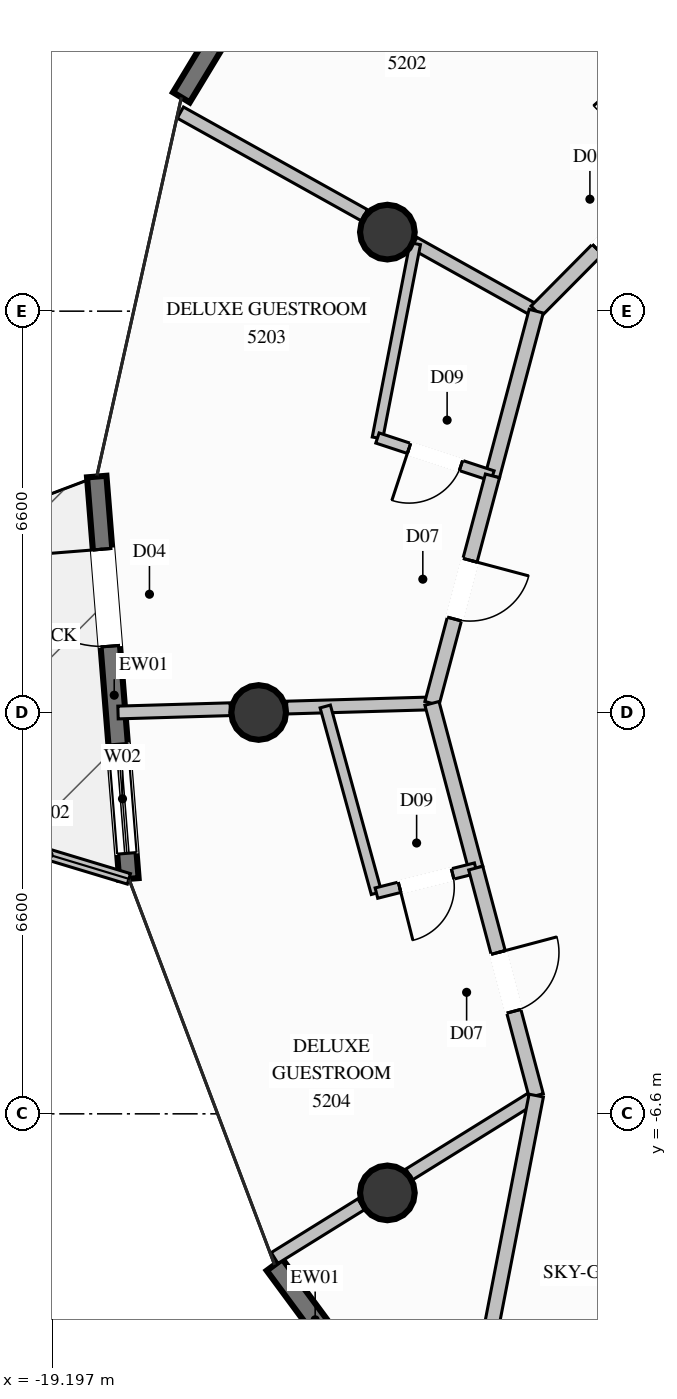
"""IFC4 building model, lengths in metres.
Left out: names, types, materials, properties, quantities, classifications, styles, units other than length and angle.
Written with IfcOpenShell. Run it as: python <this file> out.ifc"""

import sys

from ifc_helpers import new_model, si_unit, direction, frame, frame_2d, origin, origin_2d, place, context, subcontext, project, spatial, rectangle, circle, extrude, element, fill, save


model = new_model("IFC4")
c1 = context("Model", 3, precision=1e-05, world=origin(), true_north=direction((0.0, 1.0)))
c2 = subcontext(c1, "Body", "Model", "MODEL_VIEW")
j1 = project(units=[si_unit("LENGTHUNIT", "METRE"), si_unit("PLANEANGLEUNIT", "RADIAN")], contexts=[c1])
p1 = place(None, origin())
s1 = spatial("IfcSite", under=j1, at=p1, CompositionType="ELEMENT")
p2 = place(p1, origin())
s2 = spatial("IfcBuilding", under=s1, at=p2, CompositionType="ELEMENT")
p3 = place(p2, frame((0.0, 0.0, 194.8)))
s3 = spatial("IfcBuildingStorey", under=s2, at=p3, CompositionType="ELEMENT", Elevation=194.8)
for number, where, z_axis, x_axis in (
    (1, (-13.683, 7.9, 0.0), (0.0, 0.0, 1.0), (1.0, 0.0, 0.0)),
    (2, (-15.8, 0.0, 0.0), (0.0, 0.0, 1.0), (1.0, 0.0, 0.0)),
    (3, (-13.683, -7.9, 0.0), (0.0, 0.0, 1.0), (1.0, 0.0, 0.0)),
):
    element("IfcColumn", number, at=place(p3, frame(where, z_axis=z_axis, x_axis=x_axis)), inside=s3, PredefinedType="COLUMN", context=c2, shape_type="SweptSolid", body=[
        extrude(circle(Radius=0.45, at=origin_2d()), origin(), (0.0, 0.0, 1.0), 3.6),
    ])
p4 = place(p3, frame((-17.071, 10.116, 0.0), z_axis=(0.0, 0.0, 1.0), x_axis=(0.517847159829, 0.855473155077, 0.0)))
e4 = element("IfcWall", 4, at=p4, inside=s3, PredefinedType="SOLIDWALL", context=c2, shape_type="SweptSolid", body=[
    extrude(rectangle(XDim=6.131, YDim=0.32, at=frame_2d((3.066, 0.0))), origin(), (0.0, 0.0, 1.0), 3.36),
])
p5 = place(p4, frame((2.166, 0.0, 0.35)))
e5 = element("IfcOpeningElement", 5, at=p5, cuts=e4, PredefinedType="OPENING", context=c2, shape_type="SweptSolid", body=[
    extrude(rectangle(XDim=1.8, YDim=2.6, at=frame_2d((0.9, 1.3))), frame((0.0, 0.17, 0.0), z_axis=(0.0, -1.0, 0.0), x_axis=(1.0, 0.0, 0.0)), (0.0, 0.0, 1.0), 0.34),
])
p6 = place(p3, frame((-17.934, -2.736, 0.0), z_axis=(0.0, 0.0, 1.0), x_axis=(-0.079675045139, 0.996820890222, 0.0)))
e6 = element("IfcWall", 6, at=p6, inside=s3, PredefinedType="SOLIDWALL", context=c2, shape_type="SweptSolid", body=[
    extrude(rectangle(XDim=6.637, YDim=0.32, at=frame_2d((3.318, 0.0))), origin(), (0.0, 0.0, 1.0), 3.36),
])
p7 = place(p6, frame((0.421, 0.0, 0.35)))
e7 = element("IfcOpeningElement", 7, at=p7, cuts=e6, PredefinedType="OPENING", context=c2, shape_type="SweptSolid", body=[
    extrude(rectangle(XDim=1.8, YDim=2.6, at=frame_2d((0.9, 1.3))), frame((0.0, 0.17, 0.0), z_axis=(0.0, -1.0, 0.0), x_axis=(1.0, 0.0, 0.0)), (0.0, 0.0, 1.0), 0.34),
])
p8 = place(p6, frame((3.839, 0.0, 0.0)))
e8 = element("IfcOpeningElement", 8, at=p8, cuts=e6, PredefinedType="OPENING", context=c2, shape_type="SweptSolid", body=[
    extrude(rectangle(XDim=1.6, YDim=2.3, at=frame_2d((0.8, 1.15))), frame((0.0, 0.17, 0.0), z_axis=(0.0, -1.0, 0.0), x_axis=(1.0, 0.0, 0.0)), (0.0, 0.0, 1.0), 0.34),
])
p9 = place(p3, frame((-11.508, -14.542, 0.0), z_axis=(0.0, 0.0, 1.0), x_axis=(-0.593926605151, 0.804519227672, 0.0)))
e9 = element("IfcWall", 9, at=p9, inside=s3, PredefinedType="SOLIDWALL", context=c2, shape_type="SweptSolid", body=[
    extrude(rectangle(XDim=6.785, YDim=0.32, at=frame_2d((3.393, 0.0))), origin(), (0.0, 0.0, 1.0), 3.36),
])
p10 = place(p9, frame((2.488, 0.0, 0.35)))
e10 = element("IfcOpeningElement", 10, at=p10, cuts=e9, PredefinedType="OPENING", context=c2, shape_type="SweptSolid", body=[
    extrude(rectangle(XDim=1.8, YDim=2.6, at=frame_2d((0.9, 1.3))), frame((0.0, 0.17, 0.0), z_axis=(0.0, -1.0, 0.0), x_axis=(1.0, 0.0, 0.0)), (0.0, 0.0, 1.0), 0.34),
])
p11 = place(p3, frame((-20.563, -1.942, 0.0), z_axis=(0.0, 0.0, 1.0), x_axis=(0.957271539456, -0.289190594154, 0.0)))
e11 = element("IfcWall", 11, at=p11, inside=s3, PredefinedType="PARAPET", context=c2, shape_type="SweptSolid", body=[
    extrude(rectangle(XDim=2.746, YDim=0.18, at=frame_2d((1.373, 0.0))), origin(), (0.0, 0.0, 1.0), 1.12),
])
p12 = place(p3, frame((-11.235, 6.6, 0.0), z_axis=(0.0, 0.0, 1.0), x_axis=(-0.873326612339, 0.487135123123, 0.0)))
e12 = element("IfcWall", 12, at=p12, inside=s3, PredefinedType="PARTITIONING", context=c2, shape_type="SweptSolid", body=[
    extrude(rectangle(XDim=2.305, YDim=0.21, at=frame_2d((1.152, 0.0))), origin(), (0.0, 0.0, 1.0), 2.801),
])
p13 = place(p3, frame((-14.062, 8.178, 0.0), z_axis=(0.0, 0.0, 1.0), x_axis=(-0.873305073503, 0.487173735533, 0.0)))
e13 = element("IfcWall", 13, at=p13, inside=s3, PredefinedType="PARTITIONING", context=c2, shape_type="SweptSolid", body=[
    extrude(rectangle(XDim=3.465, YDim=0.21, at=frame_2d((1.732, 0.0))), origin(), (0.0, 0.0, 1.0), 3.36),
])
p14 = place(p3, frame((-12.95, 0.15, 0.0), z_axis=(0.0, 0.0, 1.0), x_axis=(-0.999584294169, -0.028831213149, 0.0)))
e14 = element("IfcWall", 14, at=p14, inside=s3, PredefinedType="PARTITIONING", context=c2, shape_type="SweptSolid", body=[
    extrude(rectangle(XDim=2.388, YDim=0.21, at=frame_2d((1.194, 0.0))), origin(), (0.0, 0.0, 1.0), 3.36),
])
p15 = place(p3, frame((-16.267, 0.054, 0.0), z_axis=(0.0, 0.0, 1.0), x_axis=(-0.999573108103, -0.029216460374, 0.0)))
e15 = element("IfcWall", 15, at=p15, inside=s3, PredefinedType="PARTITIONING", context=c2, shape_type="SweptSolid", body=[
    extrude(rectangle(XDim=1.847, YDim=0.21, at=frame_2d((0.923, 0.0))), origin(), (0.0, 0.0, 1.0), 3.36),
])
p16 = place(p3, frame((-11.235, -6.3, 0.0), z_axis=(0.0, 0.0, 1.0), x_axis=(-0.8495787928, -0.527461728302, 0.0)))
e16 = element("IfcWall", 16, at=p16, inside=s3, PredefinedType="PARTITIONING", context=c2, shape_type="SweptSolid", body=[
    extrude(rectangle(XDim=2.459, YDim=0.21, at=frame_2d((1.229, 0.0))), origin(), (0.0, 0.0, 1.0), 2.801),
])
p17 = place(p3, frame((-14.114, -8.087, 0.0), z_axis=(0.0, 0.0, 1.0), x_axis=(-0.849606407473, -0.52741724695, 0.0)))
e17 = element("IfcWall", 17, at=p17, inside=s3, PredefinedType="PARTITIONING", context=c2, shape_type="SweptSolid", body=[
    extrude(rectangle(XDim=1.676, YDim=0.21, at=frame_2d((0.838, 0.0))), origin(), (0.0, 0.0, 1.0), 3.36),
])
p18 = place(p3, frame((-8.518, 9.339, 0.0), z_axis=(0.0, 0.0, 1.0), x_axis=(-0.7042534056, -0.70994868878, 0.0)))
e18 = element("IfcWall", 18, at=p18, inside=s3, PredefinedType="PARTITIONING", context=c2, shape_type="SweptSolid", body=[
    extrude(rectangle(XDim=3.858, YDim=0.24, at=frame_2d((1.929, 0.0))), origin(), (0.0, 0.0, 1.0), 3.36),
])
p19 = place(p18, frame((1.429, 0.0, 0.0)))
e19 = element("IfcOpeningElement", 19, at=p19, cuts=e18, PredefinedType="OPENING", context=c2, shape_type="SweptSolid", body=[
    extrude(rectangle(XDim=1.0, YDim=2.2, at=frame_2d((0.5, 1.1))), frame((0.0, 0.13, 0.0), z_axis=(0.0, -1.0, 0.0), x_axis=(1.0, 0.0, 0.0)), (0.0, 0.0, 1.0), 0.26),
])
p20 = place(p3, frame((-11.235, 6.6, 0.0), z_axis=(0.0, 0.0, 1.0), x_axis=(-0.25685481711, -0.966450000221, 0.0)))
e20 = element("IfcWall", 20, at=p20, inside=s3, PredefinedType="PARTITIONING", context=c2, shape_type="SweptSolid", body=[
    extrude(rectangle(XDim=2.803, YDim=0.24, at=frame_2d((1.401, 0.0))), origin(), (0.0, 0.0, 1.0), 3.36),
])
p21 = place(p3, frame((-13.225, 7.71, 0.0), z_axis=(0.0, 0.0, 1.0), x_axis=(-0.190691026057, -0.981650107004, 0.0)))
e21 = element("IfcWall", 21, at=p21, inside=s3, PredefinedType="PLUMBINGWALL", context=c2, shape_type="SweptSolid", body=[
    extrude(rectangle(XDim=3.256, YDim=0.175, at=frame_2d((1.628, 0.0))), origin(), (0.0, 0.0, 1.0), 2.929),
])
p22 = place(p3, frame((-11.955, 3.891, 0.0), z_axis=(0.0, 0.0, 1.0), x_axis=(-0.949805498967, 0.312841036522, 0.0)))
e22 = element("IfcWall", 22, at=p22, inside=s3, PredefinedType="PLUMBINGWALL", context=c2, shape_type="SweptSolid", body=[
    extrude(rectangle(XDim=1.991, YDim=0.175, at=frame_2d((0.995, 0.0))), origin(), (0.0, 0.0, 1.0), 3.36),
])
p23 = place(p22, frame((0.545, 0.0, 0.0)))
e23 = element("IfcOpeningElement", 23, at=p23, cuts=e22, PredefinedType="OPENING", context=c2, shape_type="SweptSolid", body=[
    extrude(rectangle(XDim=0.9, YDim=2.1, at=frame_2d((0.45, 1.05))), frame((0.0, 0.098, 0.0), z_axis=(0.0, -1.0, 0.0), x_axis=(1.0, 0.0, 0.0)), (0.0, 0.0, 1.0), 0.195),
])
p24 = place(p3, frame((-11.955, 3.891, 0.0), z_axis=(0.0, 0.0, 1.0), x_axis=(-0.256991373998, -0.96641369697, 0.0)))
e24 = element("IfcWall", 24, at=p24, inside=s3, PredefinedType="PARTITIONING", context=c2, shape_type="SweptSolid", body=[
    extrude(rectangle(XDim=3.871, YDim=0.24, at=frame_2d((1.936, 0.0))), origin(), (0.0, 0.0, 1.0), 3.36),
])
p25 = place(p24, frame((1.436, 0.0, 0.0)))
e25 = element("IfcOpeningElement", 25, at=p25, cuts=e24, PredefinedType="OPENING", context=c2, shape_type="SweptSolid", body=[
    extrude(rectangle(XDim=1.0, YDim=2.2, at=frame_2d((0.5, 1.1))), frame((0.0, 0.13, 0.0), z_axis=(0.0, -1.0, 0.0), x_axis=(1.0, 0.0, 0.0)), (0.0, 0.0, 1.0), 0.26),
])
p26 = place(p3, frame((-12.95, 0.15, 0.0), z_axis=(0.0, 0.0, 1.0), x_axis=(0.25685481711, -0.966450000221, 0.0)))
e26 = element("IfcWall", 26, at=p26, inside=s3, PredefinedType="PARTITIONING", context=c2, shape_type="SweptSolid", body=[
    extrude(rectangle(XDim=2.803, YDim=0.24, at=frame_2d((1.401, 0.0))), origin(), (0.0, 0.0, 1.0), 3.36),
])
p27 = place(p3, frame((-14.705, 0.099, 0.0), z_axis=(0.0, 0.0, 1.0), x_axis=(0.264584095524, -0.964362616652, 0.0)))
e27 = element("IfcWall", 27, at=p27, inside=s3, PredefinedType="PLUMBINGWALL", context=c2, shape_type="SweptSolid", body=[
    extrude(rectangle(XDim=3.183, YDim=0.175, at=frame_2d((1.591, 0.0))), origin(), (0.0, 0.0, 1.0), 3.36),
])
p28 = place(p3, frame((-12.23, -2.559, 0.0), z_axis=(0.0, 0.0, 1.0), x_axis=(-0.969774675768, -0.244002209496, 0.0)))
e28 = element("IfcWall", 28, at=p28, inside=s3, PredefinedType="PLUMBINGWALL", context=c2, shape_type="SweptSolid", body=[
    extrude(rectangle(XDim=1.684, YDim=0.175, at=frame_2d((0.842, 0.0))), origin(), (0.0, 0.0, 1.0), 3.36),
])
p29 = place(p28, frame((0.392, 0.0, 0.0)))
e29 = element("IfcOpeningElement", 29, at=p29, cuts=e28, PredefinedType="OPENING", context=c2, shape_type="SweptSolid", body=[
    extrude(rectangle(XDim=0.9, YDim=2.1, at=frame_2d((0.45, 1.05))), frame((0.0, 0.098, 0.0), z_axis=(0.0, -1.0, 0.0), x_axis=(1.0, 0.0, 0.0)), (0.0, 0.0, 1.0), 0.195),
])
p30 = place(p3, frame((-12.23, -2.559, 0.0), z_axis=(0.0, 0.0, 1.0), x_axis=(0.257007037833, -0.966409531464, 0.0)))
e30 = element("IfcWall", 30, at=p30, inside=s3, PredefinedType="PARTITIONING", context=c2, shape_type="SweptSolid", body=[
    extrude(rectangle(XDim=3.871, YDim=0.24, at=frame_2d((1.936, 0.0))), origin(), (0.0, 0.0, 1.0), 3.36),
])
p31 = place(p30, frame((1.436, 0.0, 0.0)))
e31 = element("IfcOpeningElement", 31, at=p31, cuts=e30, PredefinedType="OPENING", context=c2, shape_type="SweptSolid", body=[
    extrude(rectangle(XDim=1.0, YDim=2.2, at=frame_2d((0.5, 1.1))), frame((0.0, 0.13, 0.0), z_axis=(0.0, -1.0, 0.0), x_axis=(1.0, 0.0, 0.0)), (0.0, 0.0, 1.0), 0.26),
])
p32 = place(p3, frame((-11.235, -6.3, 0.0), z_axis=(0.0, 0.0, 1.0), x_axis=(-0.190095078136, -0.981765685522, 0.0)))
e32 = element("IfcWall", 32, at=p32, inside=s3, PredefinedType="PARTITIONING", context=c2, shape_type="SweptSolid", body=[
    extrude(rectangle(XDim=5.602, YDim=0.24, at=frame_2d((2.801, 0.0))), origin(), (0.0, 0.0, 1.0), 3.36),
])
p33 = place(p7, origin())
e33 = element("IfcWindow", 33, at=p33, inside=s3, PartitioningType="SINGLE_PANEL", PredefinedType="WINDOW", context=c2, shape_type="SweptSolid", body=[
    extrude(rectangle(XDim=1.8, YDim=2.6, at=frame_2d((0.9, 1.3))), frame((0.0, 0.03, 0.0), z_axis=(0.0, -1.0, 0.0), x_axis=(1.0, 0.0, 0.0)), (0.0, 0.0, 1.0), 0.06),
])
fill(e7, e33)
p34 = place(p8, origin())
e34 = element("IfcDoor", 34, at=p34, inside=s3, OperationType="SINGLE_SWING_RIGHT", PredefinedType="DOOR", context=c2, shape_type="SweptSolid", body=[
    extrude(rectangle(XDim=1.6, YDim=2.3, at=frame_2d((0.8, 1.15))), frame((0.0, 0.025, 0.0), z_axis=(0.0, -1.0, 0.0), x_axis=(1.0, 0.0, 0.0)), (0.0, 0.0, 1.0), 0.05),
])
fill(e8, e34)
p35 = place(p19, origin())
e35 = element("IfcDoor", 35, at=p35, inside=s3, OperationType="SINGLE_SWING_LEFT", PredefinedType="DOOR", context=c2, shape_type="SweptSolid", body=[
    extrude(rectangle(XDim=1.0, YDim=2.2, at=frame_2d((0.5, 1.1))), frame((0.0, 0.025, 0.0), z_axis=(0.0, -1.0, 0.0), x_axis=(1.0, 0.0, 0.0)), (0.0, 0.0, 1.0), 0.05),
])
fill(e19, e35)
p36 = place(p23, origin())
e36 = element("IfcDoor", 36, at=p36, inside=s3, OperationType="SINGLE_SWING_RIGHT", PredefinedType="DOOR", context=c2, shape_type="SweptSolid", body=[
    extrude(rectangle(XDim=0.9, YDim=2.1, at=frame_2d((0.45, 1.05))), frame((0.0, 0.025, 0.0), z_axis=(0.0, -1.0, 0.0), x_axis=(1.0, 0.0, 0.0)), (0.0, 0.0, 1.0), 0.05),
])
fill(e23, e36)
p37 = place(p25, origin())
e37 = element("IfcDoor", 37, at=p37, inside=s3, OperationType="SINGLE_SWING_LEFT", PredefinedType="DOOR", context=c2, shape_type="SweptSolid", body=[
    extrude(rectangle(XDim=1.0, YDim=2.2, at=frame_2d((0.5, 1.1))), frame((0.0, 0.025, 0.0), z_axis=(0.0, -1.0, 0.0), x_axis=(1.0, 0.0, 0.0)), (0.0, 0.0, 1.0), 0.05),
])
fill(e25, e37)
p38 = place(p29, origin())
e38 = element("IfcDoor", 38, at=p38, inside=s3, OperationType="SINGLE_SWING_RIGHT", PredefinedType="DOOR", context=c2, shape_type="SweptSolid", body=[
    extrude(rectangle(XDim=0.9, YDim=2.1, at=frame_2d((0.45, 1.05))), frame((0.0, 0.025, 0.0), z_axis=(0.0, -1.0, 0.0), x_axis=(1.0, 0.0, 0.0)), (0.0, 0.0, 1.0), 0.05),
])
fill(e29, e38)
p39 = place(p31, origin())
e39 = element("IfcDoor", 39, at=p39, inside=s3, OperationType="SINGLE_SWING_LEFT", PredefinedType="DOOR", context=c2, shape_type="SweptSolid", body=[
    extrude(rectangle(XDim=1.0, YDim=2.2, at=frame_2d((0.5, 1.1))), frame((0.0, 0.025, 0.0), z_axis=(0.0, -1.0, 0.0), x_axis=(1.0, 0.0, 0.0)), (0.0, 0.0, 1.0), 0.05),
])
fill(e31, e39)
save(model, sys.argv[1])
